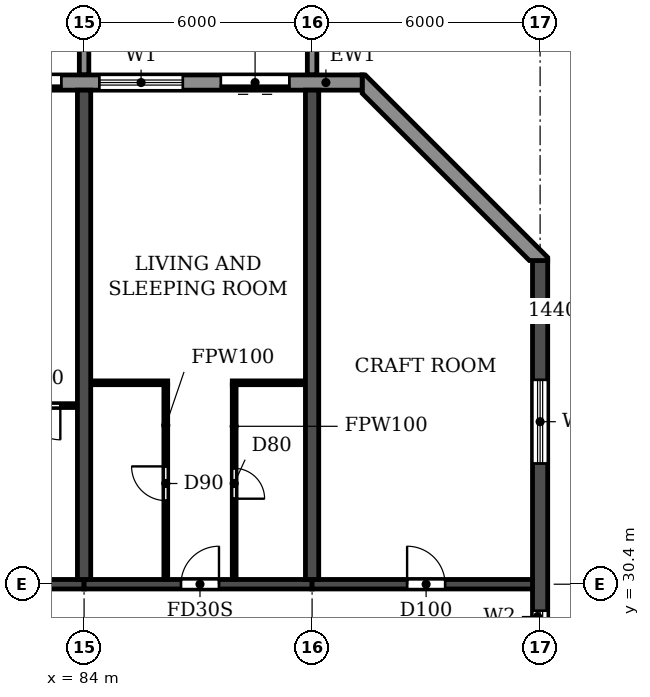
"""IFC4 building model, lengths in metres.
Left out: names, types, materials, properties, quantities, classifications, styles, units other than length and angle.
Written with IfcOpenShell. Run it as: python <this file> out.ifc"""

import sys

from ifc_helpers import new_model, si_unit, direction, frame, frame_2d, origin, place, context, subcontext, project, spatial, polyline, rectangle, outline, extrude, source, transform, mapped, element, fill, save


model = new_model("IFC4")
c1 = context("Model", 3, precision=1e-05, world=origin(), true_north=direction((0.0, 1.0)))
c2 = subcontext(c1, "Body", "Model", "MODEL_VIEW")
j1 = project(units=[si_unit("LENGTHUNIT", "METRE"), si_unit("PLANEANGLEUNIT", "RADIAN")], contexts=[c1])
p1 = place(None, origin())
s1 = spatial("IfcSite", under=j1, at=p1, CompositionType="ELEMENT")
p2 = place(p1, origin())
s2 = spatial("IfcBuilding", under=s1, at=p2, CompositionType="ELEMENT")
p3 = place(p2, frame((0.0, 0.0, 76.2)))
s3 = spatial("IfcBuildingStorey", under=s2, at=p3, CompositionType="ELEMENT", Elevation=76.2)
for number, where, z_axis, x_axis in (
    (1, (84.0, 30.525, 0.0), (0.0, 0.0, 1.0), (0.0, 1.0, 0.0)),
    (2, (90.0, 30.525, 0.0), (0.0, 0.0, 1.0), (0.0, 1.0, 0.0)),
):
    element("IfcWall", number, at=place(p3, frame(where, z_axis=z_axis, x_axis=x_axis)), inside=s3, PredefinedType="SHEAR", context=c2, shape_type="SweptSolid", body=[
        extrude(rectangle(XDim=12.875, YDim=0.35, at=frame_2d((6.438, 0.0))), origin(), (0.0, 0.0, 1.0), 3.06),
    ])
p4 = place(p3, frame((96.0, 4.683, 0.0), z_axis=(0.0, 0.0, 1.0), x_axis=(0.0, 1.0, 0.0)))
e3 = element("IfcWall", 3, at=p4, inside=s3, PredefinedType="SHEAR", context=c2, shape_type="SweptSolid", body=[
    extrude(rectangle(XDim=34.234, YDim=0.4, at=frame_2d((17.117, 0.0))), origin(), (0.0, 0.0, 1.0), 3.06),
])
p5 = place(p4, frame((15.917, 0.0, 0.9)))
e4 = element("IfcOpeningElement", 4, at=p5, cuts=e3, PredefinedType="OPENING", context=c2, shape_type="SweptSolid", body=[
    extrude(rectangle(XDim=1.2, YDim=1.5, at=frame_2d((0.6, 0.75))), frame((0.0, 0.21, 0.0), z_axis=(0.0, -1.0, 0.0), x_axis=(1.0, 0.0, 0.0)), (0.0, 0.0, 1.0), 0.42),
])
p6 = place(p4, frame((23.817, 0.0, 0.9)))
e5 = element("IfcOpeningElement", 5, at=p6, cuts=e3, PredefinedType="OPENING", context=c2, shape_type="SweptSolid", body=[
    extrude(rectangle(XDim=1.2, YDim=1.5, at=frame_2d((0.6, 0.75))), frame((0.0, 0.21, 0.0), z_axis=(0.0, -1.0, 0.0), x_axis=(1.0, 0.0, 0.0)), (0.0, 0.0, 1.0), 0.42),
])
p7 = place(p4, frame((8.017, 0.0, 0.9)))
e6 = element("IfcOpeningElement", 6, at=p7, cuts=e3, PredefinedType="OPENING", context=c2, shape_type="SweptSolid", body=[
    extrude(rectangle(XDim=1.2, YDim=1.5, at=frame_2d((0.6, 0.75))), frame((0.0, 0.21, 0.0), z_axis=(0.0, -1.0, 0.0), x_axis=(1.0, 0.0, 0.0)), (0.0, 0.0, 1.0), 0.42),
])
p8 = place(p4, frame((28.894, 0.0, 0.6)))
e7 = element("IfcOpeningElement", 7, at=p8, cuts=e3, PredefinedType="OPENING", context=c2, shape_type="SweptSolid", body=[
    extrude(rectangle(XDim=2.2, YDim=1.8, at=frame_2d((1.1, 0.9))), frame((0.0, 0.21, 0.0), z_axis=(0.0, -1.0, 0.0), x_axis=(1.0, 0.0, 0.0)), (0.0, 0.0, 1.0), 0.42),
])
p9 = place(p4, frame((2.541, 0.0, 0.6)))
e8 = element("IfcOpeningElement", 8, at=p9, cuts=e3, PredefinedType="OPENING", context=c2, shape_type="SweptSolid", body=[
    extrude(rectangle(XDim=2.2, YDim=1.8, at=frame_2d((1.1, 0.9))), frame((0.0, 0.21, 0.0), z_axis=(0.0, -1.0, 0.0), x_axis=(1.0, 0.0, 0.0)), (0.0, 0.0, 1.0), 0.42),
])
p10 = place(p3, frame((78.0, 30.4, 0.0), z_axis=(0.0, 0.0, 1.0), x_axis=(1.0, 0.0, 0.0)))
e9 = element("IfcWall", 9, at=p10, inside=s3, PredefinedType="SHEAR", context=c2, shape_type="SweptSolid", body=[
    extrude(rectangle(XDim=6.0, YDim=0.25, at=frame_2d((3.0, 0.0))), origin(), (0.0, 0.0, 1.0), 2.46),
])
p11 = place(p10, frame((2.45, 0.0, 0.0)))
e10 = element("IfcOpeningElement", 10, at=p11, cuts=e9, PredefinedType="OPENING", context=c2, shape_type="SweptSolid", body=[
    extrude(rectangle(XDim=1.0, YDim=2.1, at=frame_2d((0.5, 1.05))), frame((0.0, 0.135, 0.0), z_axis=(0.0, -1.0, 0.0), x_axis=(1.0, 0.0, 0.0)), (0.0, 0.0, 1.0), 0.27),
])
p12 = place(p3, frame((84.0, 30.4, 0.0), z_axis=(0.0, 0.0, 1.0), x_axis=(1.0, 0.0, 0.0)))
e11 = element("IfcWall", 11, at=p12, inside=s3, PredefinedType="SHEAR", context=c2, shape_type="SweptSolid", body=[
    extrude(rectangle(XDim=6.0, YDim=0.25, at=frame_2d((3.0, 0.0))), origin(), (0.0, 0.0, 1.0), 2.46),
])
p13 = place(p12, frame((2.55, 0.0, 0.0)))
e12 = element("IfcOpeningElement", 12, at=p13, cuts=e11, PredefinedType="OPENING", context=c2, shape_type="SweptSolid", body=[
    extrude(rectangle(XDim=1.0, YDim=2.1, at=frame_2d((0.5, 1.05))), frame((0.0, 0.135, 0.0), z_axis=(0.0, -1.0, 0.0), x_axis=(1.0, 0.0, 0.0)), (0.0, 0.0, 1.0), 0.27),
])
p14 = place(p3, frame((90.0, 30.4, 0.0), z_axis=(0.0, 0.0, 1.0), x_axis=(1.0, 0.0, 0.0)))
e13 = element("IfcWall", 13, at=p14, inside=s3, PredefinedType="SHEAR", context=c2, shape_type="SweptSolid", body=[
    extrude(rectangle(XDim=5.8, YDim=0.25, at=frame_2d((2.9, 0.0))), origin(), (0.0, 0.0, 1.0), 2.46),
])
p15 = place(p14, frame((2.5, 0.0, 0.0)))
e14 = element("IfcOpeningElement", 14, at=p15, cuts=e13, PredefinedType="OPENING", context=c2, shape_type="SweptSolid", body=[
    extrude(rectangle(XDim=1.0, YDim=2.1, at=frame_2d((0.5, 1.05))), frame((0.0, 0.135, 0.0), z_axis=(0.0, -1.0, 0.0), x_axis=(1.0, 0.0, 0.0)), (0.0, 0.0, 1.0), 0.27),
])
p16 = place(p3, origin())
e15 = element("IfcWall", 15, at=p16, inside=s3, PredefinedType="STANDARD", context=c2, shape_type="SweptSolid", body=[
    extrude(outline(polyline([(96.2, 38.917), (96.2, 39.0), (91.4, 43.8), (91.317, 43.8), (91.317, 43.317), (95.717, 38.917), (96.2, 38.917)])), origin(), (0.0, 0.0, 1.0), 3.06),
])
p17 = place(p3, frame((91.317, 43.6, 0.0), z_axis=(0.0, 0.0, 1.0), x_axis=(-1.0, 0.0, 0.0)))
e16 = element("IfcWall", 16, at=p17, inside=s3, PredefinedType="STANDARD", context=c2, shape_type="SweptSolid", body=[
    extrude(rectangle(XDim=80.634, YDim=0.4, at=frame_2d((40.317, 0.0))), origin(), (0.0, 0.0, 1.0), 3.06),
])
p18 = place(p17, frame((76.717, 0.0, 0.9)))
e17 = element("IfcOpeningElement", 17, at=p18, cuts=e16, PredefinedType="OPENING", context=c2, shape_type="SweptSolid", body=[
    extrude(rectangle(XDim=2.2, YDim=1.5, at=frame_2d((1.1, 0.75))), frame((0.0, 0.21, 0.0), z_axis=(0.0, -1.0, 0.0), x_axis=(1.0, 0.0, 0.0)), (0.0, 0.0, 1.0), 0.42),
])
p19 = place(p17, frame((73.917, 0.0, 0.0)))
e18 = element("IfcOpeningElement", 18, at=p19, cuts=e16, PredefinedType="OPENING", context=c2, shape_type="SweptSolid", body=[
    extrude(rectangle(XDim=1.8, YDim=2.4, at=frame_2d((0.9, 1.2))), frame((0.0, 0.21, 0.0), z_axis=(0.0, -1.0, 0.0), x_axis=(1.0, 0.0, 0.0)), (0.0, 0.0, 1.0), 0.42),
])
p20 = place(p17, frame((70.917, 0.0, 0.0)))
e19 = element("IfcOpeningElement", 19, at=p20, cuts=e16, PredefinedType="OPENING", context=c2, shape_type="SweptSolid", body=[
    extrude(rectangle(XDim=1.8, YDim=2.4, at=frame_2d((0.9, 1.2))), frame((0.0, 0.21, 0.0), z_axis=(0.0, -1.0, 0.0), x_axis=(1.0, 0.0, 0.0)), (0.0, 0.0, 1.0), 0.42),
])
p21 = place(p17, frame((67.717, 0.0, 0.9)))
e20 = element("IfcOpeningElement", 20, at=p21, cuts=e16, PredefinedType="OPENING", context=c2, shape_type="SweptSolid", body=[
    extrude(rectangle(XDim=2.2, YDim=1.5, at=frame_2d((1.1, 0.75))), frame((0.0, 0.21, 0.0), z_axis=(0.0, -1.0, 0.0), x_axis=(1.0, 0.0, 0.0)), (0.0, 0.0, 1.0), 0.42),
])
p22 = place(p17, frame((64.717, 0.0, 0.9)))
e21 = element("IfcOpeningElement", 21, at=p22, cuts=e16, PredefinedType="OPENING", context=c2, shape_type="SweptSolid", body=[
    extrude(rectangle(XDim=2.2, YDim=1.5, at=frame_2d((1.1, 0.75))), frame((0.0, 0.21, 0.0), z_axis=(0.0, -1.0, 0.0), x_axis=(1.0, 0.0, 0.0)), (0.0, 0.0, 1.0), 0.42),
])
p23 = place(p17, frame((61.917, 0.0, 0.0)))
e22 = element("IfcOpeningElement", 22, at=p23, cuts=e16, PredefinedType="OPENING", context=c2, shape_type="SweptSolid", body=[
    extrude(rectangle(XDim=1.8, YDim=2.4, at=frame_2d((0.9, 1.2))), frame((0.0, 0.21, 0.0), z_axis=(0.0, -1.0, 0.0), x_axis=(1.0, 0.0, 0.0)), (0.0, 0.0, 1.0), 0.42),
])
p24 = place(p17, frame((58.717, 0.0, 0.9)))
e23 = element("IfcOpeningElement", 23, at=p24, cuts=e16, PredefinedType="OPENING", context=c2, shape_type="SweptSolid", body=[
    extrude(rectangle(XDim=2.2, YDim=1.5, at=frame_2d((1.1, 0.75))), frame((0.0, 0.21, 0.0), z_axis=(0.0, -1.0, 0.0), x_axis=(1.0, 0.0, 0.0)), (0.0, 0.0, 1.0), 0.42),
])
p25 = place(p17, frame((55.917, 0.0, 0.0)))
e24 = element("IfcOpeningElement", 24, at=p25, cuts=e16, PredefinedType="OPENING", context=c2, shape_type="SweptSolid", body=[
    extrude(rectangle(XDim=1.8, YDim=2.4, at=frame_2d((0.9, 1.2))), frame((0.0, 0.21, 0.0), z_axis=(0.0, -1.0, 0.0), x_axis=(1.0, 0.0, 0.0)), (0.0, 0.0, 1.0), 0.42),
])
p26 = place(p17, frame((52.717, 0.0, 0.9)))
e25 = element("IfcOpeningElement", 25, at=p26, cuts=e16, PredefinedType="OPENING", context=c2, shape_type="SweptSolid", body=[
    extrude(rectangle(XDim=2.2, YDim=1.5, at=frame_2d((1.1, 0.75))), frame((0.0, 0.21, 0.0), z_axis=(0.0, -1.0, 0.0), x_axis=(1.0, 0.0, 0.0)), (0.0, 0.0, 1.0), 0.42),
])
p27 = place(p17, frame((49.717, 0.0, 0.9)))
e26 = element("IfcOpeningElement", 26, at=p27, cuts=e16, PredefinedType="OPENING", context=c2, shape_type="SweptSolid", body=[
    extrude(rectangle(XDim=2.2, YDim=1.5, at=frame_2d((1.1, 0.75))), frame((0.0, 0.21, 0.0), z_axis=(0.0, -1.0, 0.0), x_axis=(1.0, 0.0, 0.0)), (0.0, 0.0, 1.0), 0.42),
])
p28 = place(p17, frame((46.917, 0.0, 0.0)))
e27 = element("IfcOpeningElement", 27, at=p28, cuts=e16, PredefinedType="OPENING", context=c2, shape_type="SweptSolid", body=[
    extrude(rectangle(XDim=1.8, YDim=2.4, at=frame_2d((0.9, 1.2))), frame((0.0, 0.21, 0.0), z_axis=(0.0, -1.0, 0.0), x_axis=(1.0, 0.0, 0.0)), (0.0, 0.0, 1.0), 0.42),
])
p29 = place(p17, frame((43.717, 0.0, 0.9)))
e28 = element("IfcOpeningElement", 28, at=p29, cuts=e16, PredefinedType="OPENING", context=c2, shape_type="SweptSolid", body=[
    extrude(rectangle(XDim=2.2, YDim=1.5, at=frame_2d((1.1, 0.75))), frame((0.0, 0.21, 0.0), z_axis=(0.0, -1.0, 0.0), x_axis=(1.0, 0.0, 0.0)), (0.0, 0.0, 1.0), 0.42),
])
p30 = place(p17, frame((40.717, 0.0, 0.9)))
e29 = element("IfcOpeningElement", 29, at=p30, cuts=e16, PredefinedType="OPENING", context=c2, shape_type="SweptSolid", body=[
    extrude(rectangle(XDim=2.2, YDim=1.5, at=frame_2d((1.1, 0.75))), frame((0.0, 0.21, 0.0), z_axis=(0.0, -1.0, 0.0), x_axis=(1.0, 0.0, 0.0)), (0.0, 0.0, 1.0), 0.42),
])
p31 = place(p17, frame((37.917, 0.0, 0.0)))
e30 = element("IfcOpeningElement", 30, at=p31, cuts=e16, PredefinedType="OPENING", context=c2, shape_type="SweptSolid", body=[
    extrude(rectangle(XDim=1.8, YDim=2.4, at=frame_2d((0.9, 1.2))), frame((0.0, 0.21, 0.0), z_axis=(0.0, -1.0, 0.0), x_axis=(1.0, 0.0, 0.0)), (0.0, 0.0, 1.0), 0.42),
])
p32 = place(p17, frame((34.717, 0.0, 0.9)))
e31 = element("IfcOpeningElement", 31, at=p32, cuts=e16, PredefinedType="OPENING", context=c2, shape_type="SweptSolid", body=[
    extrude(rectangle(XDim=2.2, YDim=1.5, at=frame_2d((1.1, 0.75))), frame((0.0, 0.21, 0.0), z_axis=(0.0, -1.0, 0.0), x_axis=(1.0, 0.0, 0.0)), (0.0, 0.0, 1.0), 0.42),
])
p33 = place(p17, frame((31.917, 0.0, 0.0)))
e32 = element("IfcOpeningElement", 32, at=p33, cuts=e16, PredefinedType="OPENING", context=c2, shape_type="SweptSolid", body=[
    extrude(rectangle(XDim=1.8, YDim=2.4, at=frame_2d((0.9, 1.2))), frame((0.0, 0.21, 0.0), z_axis=(0.0, -1.0, 0.0), x_axis=(1.0, 0.0, 0.0)), (0.0, 0.0, 1.0), 0.42),
])
p34 = place(p17, frame((28.717, 0.0, 0.9)))
e33 = element("IfcOpeningElement", 33, at=p34, cuts=e16, PredefinedType="OPENING", context=c2, shape_type="SweptSolid", body=[
    extrude(rectangle(XDim=2.2, YDim=1.5, at=frame_2d((1.1, 0.75))), frame((0.0, 0.21, 0.0), z_axis=(0.0, -1.0, 0.0), x_axis=(1.0, 0.0, 0.0)), (0.0, 0.0, 1.0), 0.42),
])
p35 = place(p17, frame((25.717, 0.0, 0.9)))
e34 = element("IfcOpeningElement", 34, at=p35, cuts=e16, PredefinedType="OPENING", context=c2, shape_type="SweptSolid", body=[
    extrude(rectangle(XDim=2.2, YDim=1.5, at=frame_2d((1.1, 0.75))), frame((0.0, 0.21, 0.0), z_axis=(0.0, -1.0, 0.0), x_axis=(1.0, 0.0, 0.0)), (0.0, 0.0, 1.0), 0.42),
])
p36 = place(p17, frame((22.717, 0.0, 0.9)))
e35 = element("IfcOpeningElement", 35, at=p36, cuts=e16, PredefinedType="OPENING", context=c2, shape_type="SweptSolid", body=[
    extrude(rectangle(XDim=2.2, YDim=1.5, at=frame_2d((1.1, 0.75))), frame((0.0, 0.21, 0.0), z_axis=(0.0, -1.0, 0.0), x_axis=(1.0, 0.0, 0.0)), (0.0, 0.0, 1.0), 0.42),
])
p37 = place(p17, frame((19.917, 0.0, 0.0)))
e36 = element("IfcOpeningElement", 36, at=p37, cuts=e16, PredefinedType="OPENING", context=c2, shape_type="SweptSolid", body=[
    extrude(rectangle(XDim=1.8, YDim=2.4, at=frame_2d((0.9, 1.2))), frame((0.0, 0.21, 0.0), z_axis=(0.0, -1.0, 0.0), x_axis=(1.0, 0.0, 0.0)), (0.0, 0.0, 1.0), 0.42),
])
p38 = place(p17, frame((16.717, 0.0, 0.9)))
e37 = element("IfcOpeningElement", 37, at=p38, cuts=e16, PredefinedType="OPENING", context=c2, shape_type="SweptSolid", body=[
    extrude(rectangle(XDim=2.2, YDim=1.5, at=frame_2d((1.1, 0.75))), frame((0.0, 0.21, 0.0), z_axis=(0.0, -1.0, 0.0), x_axis=(1.0, 0.0, 0.0)), (0.0, 0.0, 1.0), 0.42),
])
p39 = place(p17, frame((13.717, 0.0, 0.9)))
e38 = element("IfcOpeningElement", 38, at=p39, cuts=e16, PredefinedType="OPENING", context=c2, shape_type="SweptSolid", body=[
    extrude(rectangle(XDim=2.2, YDim=1.5, at=frame_2d((1.1, 0.75))), frame((0.0, 0.21, 0.0), z_axis=(0.0, -1.0, 0.0), x_axis=(1.0, 0.0, 0.0)), (0.0, 0.0, 1.0), 0.42),
])
p40 = place(p17, frame((10.717, 0.0, 0.9)))
e39 = element("IfcOpeningElement", 39, at=p40, cuts=e16, PredefinedType="OPENING", context=c2, shape_type="SweptSolid", body=[
    extrude(rectangle(XDim=2.2, YDim=1.5, at=frame_2d((1.1, 0.75))), frame((0.0, 0.21, 0.0), z_axis=(0.0, -1.0, 0.0), x_axis=(1.0, 0.0, 0.0)), (0.0, 0.0, 1.0), 0.42),
])
p41 = place(p17, frame((7.917, 0.0, 0.0)))
e40 = element("IfcOpeningElement", 40, at=p41, cuts=e16, PredefinedType="OPENING", context=c2, shape_type="SweptSolid", body=[
    extrude(rectangle(XDim=1.8, YDim=2.4, at=frame_2d((0.9, 1.2))), frame((0.0, 0.21, 0.0), z_axis=(0.0, -1.0, 0.0), x_axis=(1.0, 0.0, 0.0)), (0.0, 0.0, 1.0), 0.42),
])
p42 = place(p17, frame((4.717, 0.0, 0.9)))
e41 = element("IfcOpeningElement", 41, at=p42, cuts=e16, PredefinedType="OPENING", context=c2, shape_type="SweptSolid", body=[
    extrude(rectangle(XDim=2.2, YDim=1.5, at=frame_2d((1.1, 0.75))), frame((0.0, 0.21, 0.0), z_axis=(0.0, -1.0, 0.0), x_axis=(1.0, 0.0, 0.0)), (0.0, 0.0, 1.0), 0.42),
])
p43 = place(p17, frame((1.917, 0.0, 0.0)))
e42 = element("IfcOpeningElement", 42, at=p43, cuts=e16, PredefinedType="OPENING", context=c2, shape_type="SweptSolid", body=[
    extrude(rectangle(XDim=1.8, YDim=2.4, at=frame_2d((0.9, 1.2))), frame((0.0, 0.21, 0.0), z_axis=(0.0, -1.0, 0.0), x_axis=(1.0, 0.0, 0.0)), (0.0, 0.0, 1.0), 0.42),
])
m1 = source(origin(), c2, "Body", "SweptSolid", [
    extrude(outline(polyline([(0.0, 0.0), (0.25, 0.0), (0.25, 3.1), (0.0, 3.1), (0.0, 0.0)])), origin(), (0.0, 0.0, 1.0), 3.1),
])
for number, where in (
    (43, (83.875, 43.8, 0.0)),
    (44, (89.875, 43.8, 0.0)),
):
    element("IfcWall", number, at=place(p3, frame(where)), inside=s3, PredefinedType="STANDARD", context=c2, shape_type="MappedRepresentation", body=[
        mapped(m1, transform((0.0, 0.0, 0.0))),
    ])
p44 = place(p3, frame((81.8, 35.1, 0.0), z_axis=(0.0, 0.0, 1.0), x_axis=(1.0, 0.0, 0.0)))
e45 = element("IfcWall", 45, at=p44, inside=s3, PredefinedType="PARTITIONING", context=c2, shape_type="SweptSolid", body=[
    extrude(rectangle(XDim=2.015, YDim=0.1, at=frame_2d((1.007, 0.0))), origin(), (0.0, 0.0, 1.0), 3.06),
])
p45 = place(p44, frame((0.675, 0.0, 0.0)))
e46 = element("IfcOpeningElement", 46, at=p45, cuts=e45, PredefinedType="OPENING", context=c2, shape_type="SweptSolid", body=[
    extrude(rectangle(XDim=0.9, YDim=2.1, at=frame_2d((0.45, 1.05))), frame((0.0, 0.06, 0.0), z_axis=(0.0, -1.0, 0.0), x_axis=(1.0, 0.0, 0.0)), (0.0, 0.0, 1.0), 0.12),
])
p46 = place(p3, frame((84.185, 35.7, 0.0), z_axis=(0.0, 0.0, 1.0), x_axis=(1.0, 0.0, 0.0)))
e47 = element("IfcWall", 47, at=p46, inside=s3, PredefinedType="PARTITIONING", context=c2, shape_type="SweptSolid", body=[
    extrude(rectangle(XDim=2.015, YDim=0.1, at=frame_2d((1.007, 0.0))), origin(), (0.0, 0.0, 1.0), 3.06),
])
p47 = place(p3, frame((87.9, 35.7, 0.0), z_axis=(0.0, 0.0, 1.0), x_axis=(1.0, 0.0, 0.0)))
e48 = element("IfcWall", 48, at=p47, inside=s3, PredefinedType="PARTITIONING", context=c2, shape_type="SweptSolid", body=[
    extrude(rectangle(XDim=1.915, YDim=0.1, at=frame_2d((0.958, 0.0))), origin(), (0.0, 0.0, 1.0), 3.06),
])
p48 = place(p3, frame((86.15, 30.535, 0.0), z_axis=(0.0, 0.0, 1.0), x_axis=(0.0, 1.0, 0.0)))
e49 = element("IfcWall", 49, at=p48, inside=s3, PredefinedType="PARTITIONING", context=c2, shape_type="SweptSolid", body=[
    extrude(rectangle(XDim=5.115, YDim=0.1, at=frame_2d((2.558, 0.0))), origin(), (0.0, 0.0, 1.0), 3.06),
])
p49 = place(p48, frame((2.065, 0.0, 0.0)))
e50 = element("IfcOpeningElement", 50, at=p49, cuts=e49, PredefinedType="OPENING", context=c2, shape_type="SweptSolid", body=[
    extrude(rectangle(XDim=0.9, YDim=2.1, at=frame_2d((0.45, 1.05))), frame((0.0, 0.06, 0.0), z_axis=(0.0, -1.0, 0.0), x_axis=(1.0, 0.0, 0.0)), (0.0, 0.0, 1.0), 0.12),
])
p50 = place(p3, frame((87.95, 30.535, 0.0), z_axis=(0.0, 0.0, 1.0), x_axis=(0.0, 1.0, 0.0)))
e51 = element("IfcWall", 51, at=p50, inside=s3, PredefinedType="PARTITIONING", context=c2, shape_type="SweptSolid", body=[
    extrude(rectangle(XDim=5.115, YDim=0.1, at=frame_2d((2.558, 0.0))), origin(), (0.0, 0.0, 1.0), 3.06),
])
p51 = place(p50, frame((2.115, 0.0, 0.0)))
e52 = element("IfcOpeningElement", 52, at=p51, cuts=e51, PredefinedType="OPENING", context=c2, shape_type="SweptSolid", body=[
    extrude(rectangle(XDim=0.8, YDim=2.1, at=frame_2d((0.4, 1.05))), frame((0.0, 0.06, 0.0), z_axis=(0.0, -1.0, 0.0), x_axis=(1.0, 0.0, 0.0)), (0.0, 0.0, 1.0), 0.12),
])
p52 = place(p6, origin())
e53 = element("IfcWindow", 53, at=p52, inside=s3, PartitioningType="SINGLE_PANEL", PredefinedType="WINDOW", context=c2, shape_type="SweptSolid", body=[
    extrude(rectangle(XDim=1.2, YDim=1.5, at=frame_2d((0.6, 0.75))), frame((0.0, 0.03, 0.0), z_axis=(0.0, -1.0, 0.0), x_axis=(1.0, 0.0, 0.0)), (0.0, 0.0, 1.0), 0.06),
])
fill(e5, e53)
p53 = place(p8, origin())
e54 = element("IfcWindow", 54, at=p53, inside=s3, PartitioningType="DOUBLE_PANEL_HORIZONTAL", PredefinedType="WINDOW", context=c2, shape_type="SweptSolid", body=[
    extrude(rectangle(XDim=2.2, YDim=1.8, at=frame_2d((1.1, 0.9))), frame((0.0, 0.03, 0.0), z_axis=(0.0, -1.0, 0.0), x_axis=(1.0, 0.0, 0.0)), (0.0, 0.0, 1.0), 0.06),
])
fill(e7, e54)
p54 = place(p41, origin())
e55 = element("IfcDoor", 55, at=p54, inside=s3, OperationType="DOUBLE_DOOR_SLIDING", PredefinedType="DOOR", context=c2, shape_type="SweptSolid", body=[
    extrude(rectangle(XDim=1.8, YDim=2.4, at=frame_2d((0.9, 1.2))), frame((0.0, 0.025, 0.0), z_axis=(0.0, -1.0, 0.0), x_axis=(1.0, 0.0, 0.0)), (0.0, 0.0, 1.0), 0.05),
])
fill(e40, e55)
p55 = place(p42, origin())
e56 = element("IfcWindow", 56, at=p55, inside=s3, PartitioningType="DOUBLE_PANEL_HORIZONTAL", PredefinedType="WINDOW", context=c2, shape_type="SweptSolid", body=[
    extrude(rectangle(XDim=2.2, YDim=1.5, at=frame_2d((1.1, 0.75))), frame((0.0, 0.03, 0.0), z_axis=(0.0, -1.0, 0.0), x_axis=(1.0, 0.0, 0.0)), (0.0, 0.0, 1.0), 0.06),
])
fill(e41, e56)
p56 = place(p43, origin())
e57 = element("IfcDoor", 57, at=p56, inside=s3, OperationType="DOUBLE_DOOR_SLIDING", PredefinedType="DOOR", context=c2, shape_type="SweptSolid", body=[
    extrude(rectangle(XDim=1.8, YDim=2.4, at=frame_2d((0.9, 1.2))), frame((0.0, 0.025, 0.0), z_axis=(0.0, -1.0, 0.0), x_axis=(1.0, 0.0, 0.0)), (0.0, 0.0, 1.0), 0.05),
])
fill(e42, e57)
p57 = place(p45, frame((0.9, 0.0, 0.0), z_axis=(0.0, 0.0, 1.0), x_axis=(-1.0, 0.0, 0.0)))
e58 = element("IfcDoor", 58, at=p57, inside=s3, OperationType="SINGLE_SWING_LEFT", PredefinedType="DOOR", context=c2, shape_type="SweptSolid", body=[
    extrude(rectangle(XDim=0.9, YDim=2.1, at=frame_2d((0.45, 1.05))), frame((0.0, 0.025, 0.0), z_axis=(0.0, -1.0, 0.0), x_axis=(1.0, 0.0, 0.0)), (0.0, 0.0, 1.0), 0.05),
])
fill(e46, e58)
p58 = place(p49, origin())
e59 = element("IfcDoor", 59, at=p58, inside=s3, OperationType="SINGLE_SWING_RIGHT", PredefinedType="DOOR", context=c2, shape_type="SweptSolid", body=[
    extrude(rectangle(XDim=0.9, YDim=2.1, at=frame_2d((0.45, 1.05))), frame((0.0, 0.025, 0.0), z_axis=(0.0, -1.0, 0.0), x_axis=(1.0, 0.0, 0.0)), (0.0, 0.0, 1.0), 0.05),
])
fill(e50, e59)
p59 = place(p13, origin())
e60 = element("IfcDoor", 60, at=p59, inside=s3, OperationType="SINGLE_SWING_RIGHT", PredefinedType="DOOR", context=c2, shape_type="SweptSolid", body=[
    extrude(rectangle(XDim=1.0, YDim=2.1, at=frame_2d((0.5, 1.05))), frame((0.0, 0.025, 0.0), z_axis=(0.0, -1.0, 0.0), x_axis=(1.0, 0.0, 0.0)), (0.0, 0.0, 1.0), 0.05),
])
fill(e12, e60)
p60 = place(p51, frame((0.8, 0.0, 0.0), z_axis=(0.0, 0.0, 1.0), x_axis=(-1.0, 0.0, 0.0)))
e61 = element("IfcDoor", 61, at=p60, inside=s3, OperationType="SINGLE_SWING_RIGHT", PredefinedType="DOOR", context=c2, shape_type="SweptSolid", body=[
    extrude(rectangle(XDim=0.8, YDim=2.1, at=frame_2d((0.4, 1.05))), frame((0.0, 0.025, 0.0), z_axis=(0.0, -1.0, 0.0), x_axis=(1.0, 0.0, 0.0)), (0.0, 0.0, 1.0), 0.05),
])
fill(e52, e61)
p61 = place(p15, origin())
e62 = element("IfcDoor", 62, at=p61, inside=s3, OperationType="SINGLE_SWING_LEFT", PredefinedType="DOOR", context=c2, shape_type="SweptSolid", body=[
    extrude(rectangle(XDim=1.0, YDim=2.1, at=frame_2d((0.5, 1.05))), frame((0.0, 0.025, 0.0), z_axis=(0.0, -1.0, 0.0), x_axis=(1.0, 0.0, 0.0)), (0.0, 0.0, 1.0), 0.05),
])
fill(e14, e62)
save(model, sys.argv[1])
